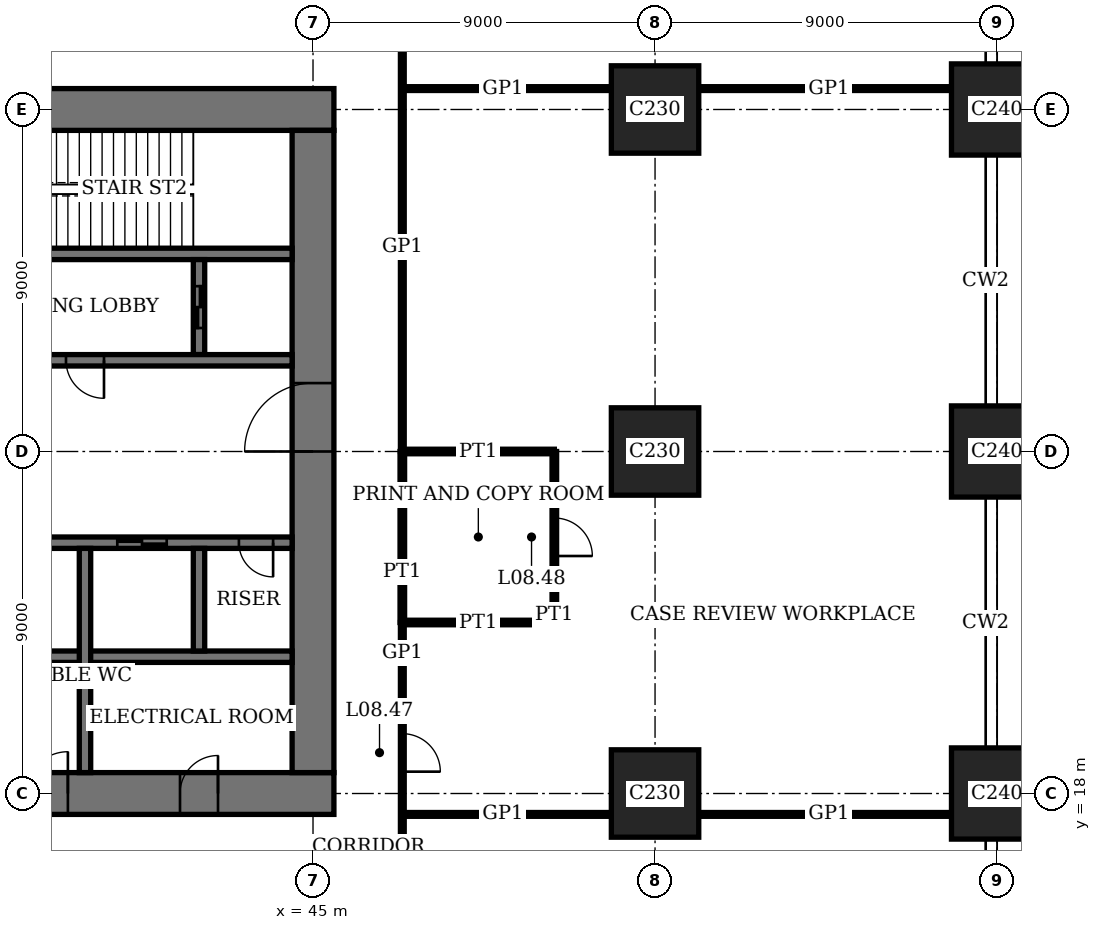
"""IFC4 building model, lengths in metres.
Left out: names, types, materials, properties, quantities, classifications, styles, units other than length and angle.
Written with IfcOpenShell. Run it as: python <this file> out.ifc"""

import sys

from ifc_helpers import new_model, si_unit, direction, frame, frame_2d, origin, origin_2d, place, context, subcontext, project, spatial, rectangle, extrude, element, fill, save


model = new_model("IFC4")
c1 = context("Model", 3, precision=1e-05, world=origin(), true_north=direction((0.0, 1.0)))
c2 = subcontext(c1, "Body", "Model", "MODEL_VIEW")
j1 = project(units=[si_unit("LENGTHUNIT", "METRE"), si_unit("PLANEANGLEUNIT", "RADIAN")], contexts=[c1])
p1 = place(None, origin())
s1 = spatial("IfcSite", under=j1, at=p1, CompositionType="ELEMENT")
p2 = place(p1, origin())
s2 = spatial("IfcBuilding", under=s1, at=p2, CompositionType="ELEMENT")
p3 = place(p2, frame((0.0, 0.0, 35.8)))
s3 = spatial("IfcBuildingStorey", under=s2, at=p3, CompositionType="ELEMENT", Elevation=35.8)
for number, where, z_axis, x_axis in (
    (1, (54.0, 18.0, 0.0), (0.0, 0.0, 1.0), (1.0, 0.0, 0.0)),
    (2, (54.0, 27.0, 0.0), (0.0, 0.0, 1.0), (1.0, 0.0, 0.0)),
    (3, (54.0, 36.0, 0.0), (0.0, 0.0, 1.0), (1.0, 0.0, 0.0)),
):
    element("IfcColumn", number, at=place(p3, frame(where, z_axis=z_axis, x_axis=x_axis)), inside=s3, PredefinedType="COLUMN", context=c2, shape_type="SweptSolid", body=[
        extrude(rectangle(XDim=2.3, YDim=2.3, at=origin_2d()), origin(), (0.0, 0.0, 1.0), 4.0),
    ])
for number, where, z_axis, x_axis in (
    (4, (63.0, 18.0, 0.0), (0.0, 0.0, 1.0), (1.0, 0.0, 0.0)),
    (5, (63.0, 27.0, 0.0), (0.0, 0.0, 1.0), (1.0, 0.0, 0.0)),
    (6, (63.0, 36.0, 0.0), (0.0, 0.0, 1.0), (1.0, 0.0, 0.0)),
):
    element("IfcColumn", number, at=place(p3, frame(where, z_axis=z_axis, x_axis=x_axis)), inside=s3, PredefinedType="COLUMN", context=c2, shape_type="SweptSolid", body=[
        extrude(rectangle(XDim=2.4, YDim=2.4, at=origin_2d()), origin(), (0.0, 0.0, 1.0), 4.0),
    ])
p4 = place(p3, frame((17.45, 18.0, 0.0), z_axis=(0.0, 0.0, 1.0), x_axis=(1.0, 0.0, 0.0)))
e7 = element("IfcWall", 7, at=p4, inside=s3, PredefinedType="SHEAR", context=c2, shape_type="SweptSolid", body=[
    extrude(rectangle(XDim=28.1, YDim=1.1, at=frame_2d((14.05, 0.0))), origin(), (0.0, 0.0, 1.0), 4.0),
])
p5 = place(p4, frame((11.55, 0.0, 0.0)))
e8 = element("IfcOpeningElement", 8, at=p5, cuts=e7, PredefinedType="OPENING", context=c2, shape_type="SweptSolid", body=[
    extrude(rectangle(XDim=1.0, YDim=2.4, at=frame_2d((0.5, 1.2))), frame((0.0, 0.56, 0.0), z_axis=(0.0, -1.0, 0.0), x_axis=(1.0, 0.0, 0.0)), (0.0, 0.0, 1.0), 1.12),
])
p6 = place(p4, frame((16.55, 0.0, 0.0)))
e9 = element("IfcOpeningElement", 9, at=p6, cuts=e7, PredefinedType="OPENING", context=c2, shape_type="SweptSolid", body=[
    extrude(rectangle(XDim=1.0, YDim=2.4, at=frame_2d((0.5, 1.2))), frame((0.0, 0.56, 0.0), z_axis=(0.0, -1.0, 0.0), x_axis=(1.0, 0.0, 0.0)), (0.0, 0.0, 1.0), 1.12),
])
p7 = place(p4, frame((20.0, 0.0, 0.0)))
e10 = element("IfcOpeningElement", 10, at=p7, cuts=e7, PredefinedType="OPENING", context=c2, shape_type="SweptSolid", body=[
    extrude(rectangle(XDim=1.1, YDim=2.4, at=frame_2d((0.55, 1.2))), frame((0.0, 0.56, 0.0), z_axis=(0.0, -1.0, 0.0), x_axis=(1.0, 0.0, 0.0)), (0.0, 0.0, 1.0), 1.12),
])
p8 = place(p4, frame((24.05, 0.0, 0.0)))
e11 = element("IfcOpeningElement", 11, at=p8, cuts=e7, PredefinedType="OPENING", context=c2, shape_type="SweptSolid", body=[
    extrude(rectangle(XDim=1.0, YDim=2.4, at=frame_2d((0.5, 1.2))), frame((0.0, 0.56, 0.0), z_axis=(0.0, -1.0, 0.0), x_axis=(1.0, 0.0, 0.0)), (0.0, 0.0, 1.0), 1.12),
])
p9 = place(p3, frame((45.55, 36.0, 0.0), z_axis=(0.0, 0.0, 1.0), x_axis=(-1.0, 0.0, 0.0)))
e12 = element("IfcWall", 12, at=p9, inside=s3, PredefinedType="SHEAR", context=c2, shape_type="SweptSolid", body=[
    extrude(rectangle(XDim=28.1, YDim=1.1, at=frame_2d((14.05, 0.0))), origin(), (0.0, 0.0, 1.0), 4.0),
])
p10 = place(p9, frame((11.55, 0.0, 0.0)))
e13 = element("IfcOpeningElement", 13, at=p10, cuts=e12, PredefinedType="OPENING", context=c2, shape_type="SweptSolid", body=[
    extrude(rectangle(XDim=1.0, YDim=2.4, at=frame_2d((0.5, 1.2))), frame((0.0, 0.56, 0.0), z_axis=(0.0, -1.0, 0.0), x_axis=(1.0, 0.0, 0.0)), (0.0, 0.0, 1.0), 1.12),
])
p11 = place(p9, frame((16.55, 0.0, 0.0)))
e14 = element("IfcOpeningElement", 14, at=p11, cuts=e12, PredefinedType="OPENING", context=c2, shape_type="SweptSolid", body=[
    extrude(rectangle(XDim=1.0, YDim=2.4, at=frame_2d((0.5, 1.2))), frame((0.0, 0.56, 0.0), z_axis=(0.0, -1.0, 0.0), x_axis=(1.0, 0.0, 0.0)), (0.0, 0.0, 1.0), 1.12),
])
p12 = place(p9, frame((20.0, 0.0, 0.0)))
e15 = element("IfcOpeningElement", 15, at=p12, cuts=e12, PredefinedType="OPENING", context=c2, shape_type="SweptSolid", body=[
    extrude(rectangle(XDim=1.1, YDim=2.4, at=frame_2d((0.55, 1.2))), frame((0.0, 0.56, 0.0), z_axis=(0.0, -1.0, 0.0), x_axis=(1.0, 0.0, 0.0)), (0.0, 0.0, 1.0), 1.12),
])
p13 = place(p9, frame((24.05, 0.0, 0.0)))
e16 = element("IfcOpeningElement", 16, at=p13, cuts=e12, PredefinedType="OPENING", context=c2, shape_type="SweptSolid", body=[
    extrude(rectangle(XDim=1.0, YDim=2.4, at=frame_2d((0.5, 1.2))), frame((0.0, 0.56, 0.0), z_axis=(0.0, -1.0, 0.0), x_axis=(1.0, 0.0, 0.0)), (0.0, 0.0, 1.0), 1.12),
])
p14 = place(p3, frame((45.0, 18.55, 0.0), z_axis=(0.0, 0.0, 1.0), x_axis=(0.0, 1.0, 0.0)))
e17 = element("IfcWall", 17, at=p14, inside=s3, PredefinedType="SHEAR", context=c2, shape_type="SweptSolid", body=[
    extrude(rectangle(XDim=16.9, YDim=1.1, at=frame_2d((8.45, 0.0))), origin(), (0.0, 0.0, 1.0), 4.0),
])
p15 = place(p14, frame((8.45, 0.0, 0.0)))
e18 = element("IfcOpeningElement", 18, at=p15, cuts=e17, PredefinedType="OPENING", context=c2, shape_type="SweptSolid", body=[
    extrude(rectangle(XDim=1.8, YDim=2.4, at=frame_2d((0.9, 1.2))), frame((0.0, 0.56, 0.0), z_axis=(0.0, -1.0, 0.0), x_axis=(1.0, 0.0, 0.0)), (0.0, 0.0, 1.0), 1.12),
])
p16 = place(p3, frame((36.15, 32.2, 0.0), z_axis=(0.0, 0.0, 1.0), x_axis=(1.0, 0.0, 0.0)))
e19 = element("IfcWall", 19, at=p16, inside=s3, PredefinedType="SHEAR", context=c2, shape_type="SweptSolid", body=[
    extrude(rectangle(XDim=8.3, YDim=0.3, at=frame_2d((4.15, 0.0))), origin(), (0.0, 0.0, 1.0), 4.0),
])
p17 = place(p16, frame((0.45, 0.0, 0.0)))
e20 = element("IfcOpeningElement", 20, at=p17, cuts=e19, PredefinedType="OPENING", context=c2, shape_type="SweptSolid", body=[
    extrude(rectangle(XDim=1.0, YDim=2.4, at=frame_2d((0.5, 1.2))), frame((0.0, 0.16, 0.0), z_axis=(0.0, -1.0, 0.0), x_axis=(1.0, 0.0, 0.0)), (0.0, 0.0, 1.0), 0.32),
])
p18 = place(p3, frame((42.0, 29.55, 0.0), z_axis=(0.0, 0.0, 1.0), x_axis=(0.0, 1.0, 0.0)))
e21 = element("IfcWall", 21, at=p18, inside=s3, PredefinedType="SHEAR", context=c2, shape_type="SweptSolid", body=[
    extrude(rectangle(XDim=2.5, YDim=0.3, at=frame_2d((1.25, 0.0))), origin(), (0.0, 0.0, 1.0), 4.0),
])
p19 = place(p18, frame((0.7, 0.0, 0.0)))
e22 = element("IfcOpeningElement", 22, at=p19, cuts=e21, PredefinedType="OPENING", context=c2, shape_type="SweptSolid", body=[
    extrude(rectangle(XDim=1.1, YDim=2.4, at=frame_2d((0.55, 1.2))), frame((0.0, 0.16, 0.0), z_axis=(0.0, -1.0, 0.0), x_axis=(1.0, 0.0, 0.0)), (0.0, 0.0, 1.0), 0.32),
])
p20 = place(p3, frame((18.55, 24.6, 0.0), z_axis=(0.0, 0.0, 1.0), x_axis=(1.0, 0.0, 0.0)))
e23 = element("IfcWall", 23, at=p20, inside=s3, PredefinedType="SHEAR", context=c2, shape_type="SweptSolid", body=[
    extrude(rectangle(XDim=25.9, YDim=0.3, at=frame_2d((12.95, 0.0))), origin(), (0.0, 0.0, 1.0), 4.0),
])
p21 = place(p20, frame((4.95, 0.0, 0.0)))
e24 = element("IfcOpeningElement", 24, at=p21, cuts=e23, PredefinedType="OPENING", context=c2, shape_type="SweptSolid", body=[
    extrude(rectangle(XDim=1.0, YDim=2.4, at=frame_2d((0.5, 1.2))), frame((0.0, 0.16, 0.0), z_axis=(0.0, -1.0, 0.0), x_axis=(1.0, 0.0, 0.0)), (0.0, 0.0, 1.0), 0.32),
])
p22 = place(p20, frame((24.5, 0.0, 0.0)))
e25 = element("IfcOpeningElement", 25, at=p22, cuts=e23, PredefinedType="OPENING", context=c2, shape_type="SweptSolid", body=[
    extrude(rectangle(XDim=0.9, YDim=2.1, at=frame_2d((0.45, 1.05))), frame((0.0, 0.16, 0.0), z_axis=(0.0, -1.0, 0.0), x_axis=(1.0, 0.0, 0.0)), (0.0, 0.0, 1.0), 0.32),
])
p23 = place(p20, frame((9.4, 0.0, 0.0)))
e26 = element("IfcOpeningElement", 26, at=p23, cuts=e23, PredefinedType="OPENING", context=c2, shape_type="SweptSolid", body=[
    extrude(rectangle(XDim=1.1, YDim=2.4, at=frame_2d((0.55, 1.2))), frame((0.0, 0.16, 0.0), z_axis=(0.0, -1.0, 0.0), x_axis=(1.0, 0.0, 0.0)), (0.0, 0.0, 1.0), 0.32),
])
p24 = place(p20, frame((12.4, 0.0, 0.0)))
e27 = element("IfcOpeningElement", 27, at=p24, cuts=e23, PredefinedType="OPENING", context=c2, shape_type="SweptSolid", body=[
    extrude(rectangle(XDim=1.1, YDim=2.4, at=frame_2d((0.55, 1.2))), frame((0.0, 0.16, 0.0), z_axis=(0.0, -1.0, 0.0), x_axis=(1.0, 0.0, 0.0)), (0.0, 0.0, 1.0), 0.32),
])
p25 = place(p20, frame((15.4, 0.0, 0.0)))
e28 = element("IfcOpeningElement", 28, at=p25, cuts=e23, PredefinedType="OPENING", context=c2, shape_type="SweptSolid", body=[
    extrude(rectangle(XDim=1.1, YDim=2.4, at=frame_2d((0.55, 1.2))), frame((0.0, 0.16, 0.0), z_axis=(0.0, -1.0, 0.0), x_axis=(1.0, 0.0, 0.0)), (0.0, 0.0, 1.0), 0.32),
])
p26 = place(p20, frame((18.4, 0.0, 0.0)))
e29 = element("IfcOpeningElement", 29, at=p26, cuts=e23, PredefinedType="OPENING", context=c2, shape_type="SweptSolid", body=[
    extrude(rectangle(XDim=1.1, YDim=2.4, at=frame_2d((0.55, 1.2))), frame((0.0, 0.16, 0.0), z_axis=(0.0, -1.0, 0.0), x_axis=(1.0, 0.0, 0.0)), (0.0, 0.0, 1.0), 0.32),
])
p27 = place(p20, frame((21.3, 0.0, 0.0)))
e30 = element("IfcOpeningElement", 30, at=p27, cuts=e23, PredefinedType="OPENING", context=c2, shape_type="SweptSolid", body=[
    extrude(rectangle(XDim=1.3, YDim=2.4, at=frame_2d((0.65, 1.2))), frame((0.0, 0.16, 0.0), z_axis=(0.0, -1.0, 0.0), x_axis=(1.0, 0.0, 0.0)), (0.0, 0.0, 1.0), 0.32),
])
p28 = place(p3, frame((18.55, 29.4, 0.0), z_axis=(0.0, 0.0, 1.0), x_axis=(1.0, 0.0, 0.0)))
e31 = element("IfcWall", 31, at=p28, inside=s3, PredefinedType="SHEAR", context=c2, shape_type="SweptSolid", body=[
    extrude(rectangle(XDim=25.9, YDim=0.3, at=frame_2d((12.95, 0.0))), origin(), (0.0, 0.0, 1.0), 4.0),
])
p29 = place(p28, frame((19.95, 0.0, 0.0)))
e32 = element("IfcOpeningElement", 32, at=p29, cuts=e31, PredefinedType="OPENING", context=c2, shape_type="SweptSolid", body=[
    extrude(rectangle(XDim=1.0, YDim=2.4, at=frame_2d((0.5, 1.2))), frame((0.0, 0.16, 0.0), z_axis=(0.0, -1.0, 0.0), x_axis=(1.0, 0.0, 0.0)), (0.0, 0.0, 1.0), 0.32),
])
p30 = place(p28, frame((0.5, 0.0, 0.0)))
e33 = element("IfcOpeningElement", 33, at=p30, cuts=e31, PredefinedType="OPENING", context=c2, shape_type="SweptSolid", body=[
    extrude(rectangle(XDim=0.9, YDim=2.1, at=frame_2d((0.45, 1.05))), frame((0.0, 0.16, 0.0), z_axis=(0.0, -1.0, 0.0), x_axis=(1.0, 0.0, 0.0)), (0.0, 0.0, 1.0), 0.32),
])
p31 = place(p28, frame((3.3, 0.0, 0.0)))
e34 = element("IfcOpeningElement", 34, at=p31, cuts=e31, PredefinedType="OPENING", context=c2, shape_type="SweptSolid", body=[
    extrude(rectangle(XDim=1.3, YDim=2.4, at=frame_2d((0.65, 1.2))), frame((0.0, 0.16, 0.0), z_axis=(0.0, -1.0, 0.0), x_axis=(1.0, 0.0, 0.0)), (0.0, 0.0, 1.0), 0.32),
])
p32 = place(p3, frame((27.15, 21.6, 0.0), z_axis=(0.0, 0.0, 1.0), x_axis=(1.0, 0.0, 0.0)))
e35 = element("IfcWall", 35, at=p32, inside=s3, PredefinedType="SHEAR", context=c2, shape_type="SweptSolid", body=[
    extrude(rectangle(XDim=17.3, YDim=0.3, at=frame_2d((8.65, 0.0))), origin(), (0.0, 0.0, 1.0), 4.0),
])
p33 = place(p3, frame((39.0, 18.55, 0.0), z_axis=(0.0, 0.0, 1.0), x_axis=(0.0, 1.0, 0.0)))
e36 = element("IfcWall", 36, at=p33, inside=s3, PredefinedType="SHEAR", context=c2, shape_type="SweptSolid", body=[
    extrude(rectangle(XDim=5.9, YDim=0.3, at=frame_2d((2.95, 0.0))), origin(), (0.0, 0.0, 1.0), 4.0),
])
p34 = place(p3, frame((42.0, 21.75, 0.0), z_axis=(0.0, 0.0, 1.0), x_axis=(0.0, 1.0, 0.0)))
e37 = element("IfcWall", 37, at=p34, inside=s3, PredefinedType="SHEAR", context=c2, shape_type="SweptSolid", body=[
    extrude(rectangle(XDim=2.7, YDim=0.3, at=frame_2d((1.35, 0.0))), origin(), (0.0, 0.0, 1.0), 4.0),
])
p35 = place(p3, frame((47.35, 17.45, 0.0), z_axis=(0.0, 0.0, 1.0), x_axis=(1.0, 0.0, 0.0)))
e38 = element("IfcWall", 38, at=p35, inside=s3, PredefinedType="PARTITIONING", context=c2, shape_type="SweptSolid", body=[
    extrude(rectangle(XDim=5.5, YDim=0.1, at=frame_2d((2.75, 0.0))), origin(), (0.0, 0.0, 1.0), 3.75),
])
p36 = place(p3, frame((55.15, 17.45, 0.0), z_axis=(0.0, 0.0, 1.0), x_axis=(1.0, 0.0, 0.0)))
e39 = element("IfcWall", 39, at=p36, inside=s3, PredefinedType="PARTITIONING", context=c2, shape_type="SweptSolid", body=[
    extrude(rectangle(XDim=6.65, YDim=0.1, at=frame_2d((3.325, 0.0))), origin(), (0.0, 0.0, 1.0), 3.75),
])
p37 = place(p3, frame((47.35, 22.5, 0.0), z_axis=(0.0, 0.0, 1.0), x_axis=(1.0, 0.0, 0.0)))
e40 = element("IfcWall", 40, at=p37, inside=s3, PredefinedType="PARTITIONING", context=c2, shape_type="SweptSolid", body=[
    extrude(rectangle(XDim=4.0, YDim=0.12, at=frame_2d((2.0, 0.0))), origin(), (0.0, 0.0, 1.0), 3.1),
])
p38 = place(p3, frame((47.35, 27.0, 0.0), z_axis=(0.0, 0.0, 1.0), x_axis=(1.0, 0.0, 0.0)))
e41 = element("IfcWall", 41, at=p38, inside=s3, PredefinedType="PARTITIONING", context=c2, shape_type="SweptSolid", body=[
    extrude(rectangle(XDim=4.0, YDim=0.12, at=frame_2d((2.0, 0.0))), origin(), (0.0, 0.0, 1.0), 3.05),
])
p39 = place(p3, frame((47.35, 36.55, 0.0), z_axis=(0.0, 0.0, 1.0), x_axis=(1.0, 0.0, 0.0)))
e42 = element("IfcWall", 42, at=p39, inside=s3, PredefinedType="PARTITIONING", context=c2, shape_type="SweptSolid", body=[
    extrude(rectangle(XDim=5.5, YDim=0.1, at=frame_2d((2.75, 0.0))), origin(), (0.0, 0.0, 1.0), 3.75),
])
p40 = place(p3, frame((55.15, 36.55, 0.0), z_axis=(0.0, 0.0, 1.0), x_axis=(1.0, 0.0, 0.0)))
e43 = element("IfcWall", 43, at=p40, inside=s3, PredefinedType="PARTITIONING", context=c2, shape_type="SweptSolid", body=[
    extrude(rectangle(XDim=6.65, YDim=0.1, at=frame_2d((3.325, 0.0))), origin(), (0.0, 0.0, 1.0), 3.75),
])
p41 = place(p3, frame((47.35, 22.5, 0.0), z_axis=(0.0, 0.0, 1.0), x_axis=(0.0, 1.0, 0.0)))
e44 = element("IfcWall", 44, at=p41, inside=s3, PredefinedType="PARTITIONING", context=c2, shape_type="SweptSolid", body=[
    extrude(rectangle(XDim=4.5, YDim=0.12, at=frame_2d((2.25, 0.0))), origin(), (0.0, 0.0, 1.0), 3.75),
])
p42 = place(p3, frame((47.35, 15.65, 0.0), z_axis=(0.0, 0.0, 1.0), x_axis=(0.0, 1.0, 0.0)))
e45 = element("IfcWall", 45, at=p42, inside=s3, PredefinedType="PARTITIONING", context=c2, shape_type="SweptSolid", body=[
    extrude(rectangle(XDim=6.85, YDim=0.1, at=frame_2d((3.425, 0.0))), origin(), (0.0, 0.0, 1.0), 3.75),
])
p43 = place(p42, frame((2.925, 0.0, 0.0)))
e46 = element("IfcOpeningElement", 46, at=p43, cuts=e45, PredefinedType="OPENING", context=c2, shape_type="SweptSolid", body=[
    extrude(rectangle(XDim=1.0, YDim=2.4, at=frame_2d((0.5, 1.2))), frame((0.0, 0.06, 0.0), z_axis=(0.0, -1.0, 0.0), x_axis=(1.0, 0.0, 0.0)), (0.0, 0.0, 1.0), 0.12),
])
p44 = place(p3, frame((47.35, 27.0, 0.0), z_axis=(0.0, 0.0, 1.0), x_axis=(0.0, 1.0, 0.0)))
e47 = element("IfcWall", 47, at=p44, inside=s3, PredefinedType="PARTITIONING", context=c2, shape_type="SweptSolid", body=[
    extrude(rectangle(XDim=11.35, YDim=0.1, at=frame_2d((5.675, 0.0))), origin(), (0.0, 0.0, 1.0), 3.75),
])
p45 = place(p3, frame((51.35, 22.5, 0.0), z_axis=(0.0, 0.0, 1.0), x_axis=(0.0, 1.0, 0.0)))
e48 = element("IfcWall", 48, at=p45, inside=s3, PredefinedType="PARTITIONING", context=c2, shape_type="SweptSolid", body=[
    extrude(rectangle(XDim=4.5, YDim=0.12, at=frame_2d((2.25, 0.0))), origin(), (0.0, 0.0, 1.0), 3.75),
])
p46 = place(p45, frame((1.75, 0.0, 0.0)))
e49 = element("IfcOpeningElement", 49, at=p46, cuts=e48, PredefinedType="OPENING", context=c2, shape_type="SweptSolid", body=[
    extrude(rectangle(XDim=1.0, YDim=2.4, at=frame_2d((0.5, 1.2))), frame((0.0, 0.07, 0.0), z_axis=(0.0, -1.0, 0.0), x_axis=(1.0, 0.0, 0.0)), (0.0, 0.0, 1.0), 0.14),
])
p47 = place(p15, origin())
e50 = element("IfcDoor", 50, at=p47, inside=s3, OperationType="DOUBLE_DOOR_DOUBLE_SWING", PredefinedType="DOOR", context=c2, shape_type="SweptSolid", body=[
    extrude(rectangle(XDim=1.8, YDim=2.4, at=frame_2d((0.9, 1.2))), frame((0.0, 0.03, 0.0), z_axis=(0.0, -1.0, 0.0), x_axis=(1.0, 0.0, 0.0)), (0.0, 0.0, 1.0), 0.06),
    extrude(rectangle(XDim=0.04, YDim=2.4, at=frame_2d((0.02, 1.2))), frame((0.0, 0.55, 0.0), z_axis=(0.0, -1.0, 0.0), x_axis=(1.0, 0.0, 0.0)), (0.0, 0.0, 1.0), 1.1),
    extrude(rectangle(XDim=0.04, YDim=2.4, at=frame_2d((1.78, 1.2))), frame((0.0, 0.55, 0.0), z_axis=(0.0, -1.0, 0.0), x_axis=(1.0, 0.0, 0.0)), (0.0, 0.0, 1.0), 1.1),
    extrude(rectangle(XDim=1.8, YDim=0.04, at=frame_2d((0.9, 2.38))), frame((0.0, 0.55, 0.0), z_axis=(0.0, -1.0, 0.0), x_axis=(1.0, 0.0, 0.0)), (0.0, 0.0, 1.0), 1.1),
])
fill(e18, e50)
p48 = place(p7, origin())
e51 = element("IfcDoor", 51, at=p48, inside=s3, OperationType="SINGLE_SWING_LEFT", PredefinedType="DOOR", context=c2, shape_type="SweptSolid", body=[
    extrude(rectangle(XDim=1.1, YDim=2.4, at=frame_2d((0.55, 1.2))), frame((0.0, 0.025, 0.0), z_axis=(0.0, -1.0, 0.0), x_axis=(1.0, 0.0, 0.0)), (0.0, 0.0, 1.0), 0.05),
    extrude(rectangle(XDim=0.04, YDim=2.4, at=frame_2d((0.02, 1.2))), frame((0.0, 0.44, 0.0), z_axis=(0.0, -1.0, 0.0), x_axis=(1.0, 0.0, 0.0)), (0.0, 0.0, 1.0), 0.88),
    extrude(rectangle(XDim=0.04, YDim=2.4, at=frame_2d((1.08, 1.2))), frame((0.0, 0.44, 0.0), z_axis=(0.0, -1.0, 0.0), x_axis=(1.0, 0.0, 0.0)), (0.0, 0.0, 1.0), 0.88),
    extrude(rectangle(XDim=1.1, YDim=0.04, at=frame_2d((0.55, 2.38))), frame((0.0, 0.44, 0.0), z_axis=(0.0, -1.0, 0.0), x_axis=(1.0, 0.0, 0.0)), (0.0, 0.0, 1.0), 0.88),
])
fill(e10, e51)
p49 = place(p8, origin())
e52 = element("IfcDoor", 52, at=p49, inside=s3, OperationType="SINGLE_SWING_LEFT", PredefinedType="DOOR", context=c2, shape_type="SweptSolid", body=[
    extrude(rectangle(XDim=1.0, YDim=2.4, at=frame_2d((0.5, 1.2))), frame((0.0, 0.025, 0.0), z_axis=(0.0, -1.0, 0.0), x_axis=(1.0, 0.0, 0.0)), (0.0, 0.0, 1.0), 0.05),
    extrude(rectangle(XDim=0.04, YDim=2.4, at=frame_2d((0.02, 1.2))), frame((0.0, 0.4, 0.0), z_axis=(0.0, -1.0, 0.0), x_axis=(1.0, 0.0, 0.0)), (0.0, 0.0, 1.0), 0.8),
    extrude(rectangle(XDim=0.04, YDim=2.4, at=frame_2d((0.98, 1.2))), frame((0.0, 0.4, 0.0), z_axis=(0.0, -1.0, 0.0), x_axis=(1.0, 0.0, 0.0)), (0.0, 0.0, 1.0), 0.8),
    extrude(rectangle(XDim=1.0, YDim=0.04, at=frame_2d((0.5, 2.38))), frame((0.0, 0.4, 0.0), z_axis=(0.0, -1.0, 0.0), x_axis=(1.0, 0.0, 0.0)), (0.0, 0.0, 1.0), 0.8),
])
fill(e11, e52)
p50 = place(p29, origin())
e53 = element("IfcDoor", 53, at=p50, inside=s3, OperationType="SINGLE_SWING_RIGHT", PredefinedType="DOOR", context=c2, shape_type="SweptSolid", body=[
    extrude(rectangle(XDim=1.0, YDim=2.4, at=frame_2d((0.5, 1.2))), frame((0.0, 0.03, 0.0), z_axis=(0.0, -1.0, 0.0), x_axis=(1.0, 0.0, 0.0)), (0.0, 0.0, 1.0), 0.06),
])
fill(e32, e53)
p51 = place(p22, origin())
e54 = element("IfcDoor", 54, at=p51, inside=s3, OperationType="SINGLE_SWING_RIGHT", PredefinedType="DOOR", context=c2, shape_type="SweptSolid", body=[
    extrude(rectangle(XDim=0.9, YDim=2.1, at=frame_2d((0.45, 1.05))), frame((0.0, 0.03, 0.0), z_axis=(0.0, -1.0, 0.0), x_axis=(1.0, 0.0, 0.0)), (0.0, 0.0, 1.0), 0.06),
])
fill(e25, e54)
p52 = place(p43, origin())
e55 = element("IfcDoor", 55, at=p52, inside=s3, OperationType="SINGLE_SWING_LEFT", PredefinedType="DOOR", context=c2, shape_type="SweptSolid", body=[
    extrude(rectangle(XDim=1.0, YDim=2.4, at=frame_2d((0.5, 1.2))), frame((0.0, 0.02, 0.0), z_axis=(0.0, -1.0, 0.0), x_axis=(1.0, 0.0, 0.0)), (0.0, 0.0, 1.0), 0.04),
])
fill(e46, e55)
p53 = place(p46, origin())
e56 = element("IfcDoor", 56, at=p53, inside=s3, OperationType="SINGLE_SWING_LEFT", PredefinedType="DOOR", context=c2, shape_type="SweptSolid", body=[
    extrude(rectangle(XDim=1.0, YDim=2.4, at=frame_2d((0.5, 1.2))), frame((0.0, 0.025, 0.0), z_axis=(0.0, -1.0, 0.0), x_axis=(1.0, 0.0, 0.0)), (0.0, 0.0, 1.0), 0.05),
])
fill(e49, e56)
p54 = place(p27, origin())
e57 = element("IfcDoor", 57, at=p54, inside=s3, OperationType="DOUBLE_DOOR_SLIDING", PredefinedType="DOOR", context=c2, shape_type="SweptSolid", body=[
    extrude(rectangle(XDim=1.3, YDim=2.4, at=frame_2d((0.65, 1.2))), frame((0.0, 0.02, 0.0), z_axis=(0.0, -1.0, 0.0), x_axis=(1.0, 0.0, 0.0)), (0.0, 0.0, 1.0), 0.04),
])
fill(e30, e57)
p55 = place(p19, origin())
e58 = element("IfcDoor", 58, at=p55, inside=s3, OperationType="DOUBLE_DOOR_SLIDING", PredefinedType="DOOR", context=c2, shape_type="SweptSolid", body=[
    extrude(rectangle(XDim=1.1, YDim=2.4, at=frame_2d((0.55, 1.2))), frame((0.0, 0.03, 0.0), z_axis=(0.0, -1.0, 0.0), x_axis=(1.0, 0.0, 0.0)), (0.0, 0.0, 1.0), 0.06),
])
fill(e22, e58)
save(model, sys.argv[1])
